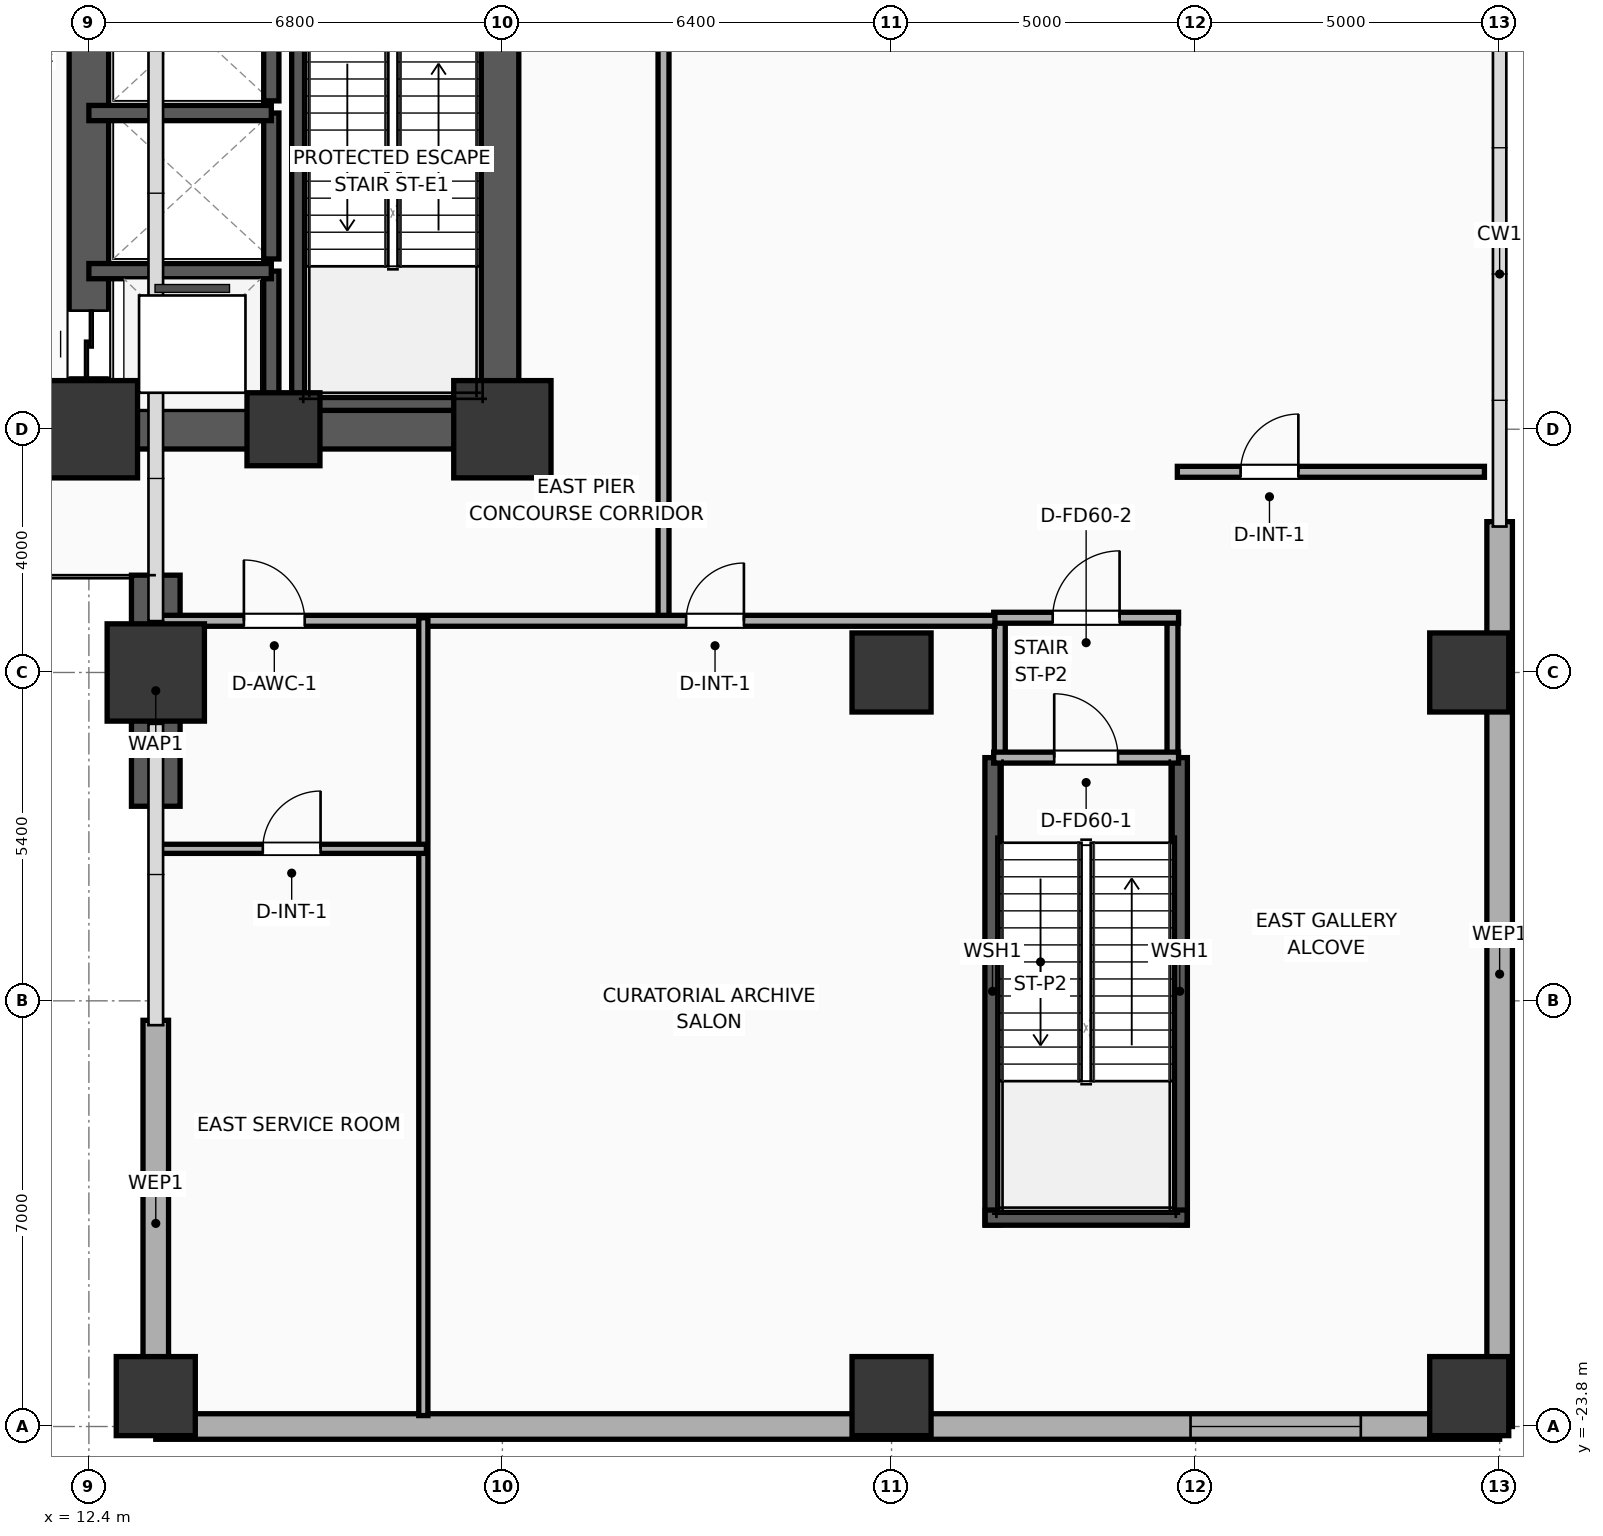
"""IFC4 building model, lengths in metres.
Left out: names, types, materials, properties, quantities, classifications, styles, units other than length and angle.
Written with IfcOpenShell. Run it as: python <this file> out.ifc"""

import sys

from ifc_helpers import new_model, si_unit, direction, frame, frame_2d, origin, origin_2d, place, context, subcontext, project, spatial, rectangle, extrude, element, fill, save


model = new_model("IFC4")
c1 = context("Model", 3, precision=1e-05, world=origin(), true_north=direction((0.0, 1.0)))
c2 = subcontext(c1, "Body", "Model", "MODEL_VIEW")
j1 = project(units=[si_unit("LENGTHUNIT", "METRE"), si_unit("PLANEANGLEUNIT", "RADIAN")], contexts=[c1])
p1 = place(None, origin())
s1 = spatial("IfcSite", under=j1, at=p1, CompositionType="ELEMENT")
p2 = place(p1, origin())
s2 = spatial("IfcBuilding", under=s1, at=p2, CompositionType="ELEMENT")
p3 = place(p2, frame((0.0, 0.0, 5.2)))
s3 = spatial("IfcBuildingStorey", under=s2, at=p3, CompositionType="ELEMENT", Elevation=5.2)
p4 = place(p3, frame((12.4, -7.4, 0.0), z_axis=(0.0, 0.0, 1.0), x_axis=(1.0, 0.0, 0.0)))
e1 = element("IfcColumn", 1, at=p4, inside=s3, PredefinedType="COLUMN", context=c2, shape_type="SweptSolid", body=[
    extrude(rectangle(XDim=1.6, YDim=1.6, at=origin_2d()), origin(), (0.0, 0.0, 1.0), 5.2),
])
p5 = place(p3, frame((15.6, -7.4, 0.0), z_axis=(0.0, 0.0, 1.0), x_axis=(1.0, 0.0, 0.0)))
e2 = element("IfcColumn", 2, at=p5, inside=s3, PredefinedType="COLUMN", context=c2, shape_type="SweptSolid", body=[
    extrude(rectangle(XDim=1.2, YDim=1.2, at=origin_2d()), origin(), (0.0, 0.0, 1.0), 5.2),
])
p6 = place(p3, frame((19.2, -7.4, 0.0), z_axis=(0.0, 0.0, 1.0), x_axis=(1.0, 0.0, 0.0)))
e3 = element("IfcColumn", 3, at=p6, inside=s3, PredefinedType="COLUMN", context=c2, shape_type="SweptSolid", body=[
    extrude(rectangle(XDim=1.6, YDim=1.6, at=origin_2d()), origin(), (0.0, 0.0, 1.0), 5.2),
])
p7 = place(p3, frame((12.075, -7.4, 0.0), z_axis=(0.0, 0.0, 1.0), x_axis=(1.0, 0.0, 0.0)))
e4 = element("IfcWall", 4, at=p7, inside=s3, PredefinedType="SHEAR", context=c2, shape_type="SweptSolid", body=[
    extrude(rectangle(XDim=7.45, YDim=0.65, at=frame_2d((3.725, 0.0))), origin(), (0.0, 0.0, 1.0), 4.92),
])
p8 = place(p3, frame((12.4, -7.4, 0.0), z_axis=(0.0, 0.0, 1.0), x_axis=(0.0, 1.0, 0.0)))
e5 = element("IfcWall", 5, at=p8, inside=s3, PredefinedType="SHEAR", context=c2, shape_type="SweptSolid", body=[
    extrude(rectangle(XDim=14.8, YDim=0.65, at=frame_2d((7.4, 0.0))), origin(), (0.0, 0.0, 1.0), 4.92),
])
p9 = place(p8, frame((0.85, 0.0, 0.0)))
e6 = element("IfcOpeningElement", 6, at=p9, cuts=e5, PredefinedType="OPENING", context=c2, shape_type="SweptSolid", body=[
    extrude(rectangle(XDim=1.1, YDim=2.05, at=frame_2d((0.55, 1.025))), frame((0.0, 0.335, 0.0), z_axis=(0.0, -1.0, 0.0), x_axis=(1.0, 0.0, 0.0)), (0.0, 0.0, 1.0), 0.67),
])
p10 = place(p8, frame((10.53, 0.0, 0.0)))
e7 = element("IfcOpeningElement", 7, at=p10, cuts=e5, PredefinedType="OPENING", context=c2, shape_type="SweptSolid", body=[
    extrude(rectangle(XDim=1.1, YDim=2.05, at=frame_2d((0.55, 1.025))), frame((0.0, 0.335, 0.0), z_axis=(0.0, -1.0, 0.0), x_axis=(1.0, 0.0, 0.0)), (0.0, 0.0, 1.0), 0.67),
])
p11 = place(p3, frame((19.145, -7.4, 0.0), z_axis=(0.0, 0.0, 1.0), x_axis=(0.0, 1.0, 0.0)))
e8 = element("IfcWall", 8, at=p11, inside=s3, PredefinedType="SHEAR", context=c2, shape_type="SweptSolid", body=[
    extrude(rectangle(XDim=14.8, YDim=0.65, at=frame_2d((7.4, 0.0))), origin(), (0.0, 0.0, 1.0), 4.92),
])
p12 = place(p3, frame((15.86, -7.085, 0.0), z_axis=(0.0, 0.0, 1.0), x_axis=(0.0, 1.0, 0.0)))
e9 = element("IfcWall", 9, at=p12, inside=s3, PredefinedType="SOLIDWALL", context=c2, shape_type="SweptSolid", body=[
    extrude(rectangle(XDim=7.685, YDim=0.25, at=frame_2d((3.843, 0.0))), origin(), (0.0, 0.0, 1.0), 4.92),
])
p13 = place(p3, frame((15.74, -6.965, 0.0), z_axis=(0.0, 0.0, 1.0), x_axis=(1.0, 0.0, 0.0)))
e10 = element("IfcWall", 10, at=p13, inside=s3, PredefinedType="SOLIDWALL", context=c2, shape_type="SweptSolid", body=[
    extrude(rectangle(XDim=3.46, YDim=0.25, at=frame_2d((1.73, 0.0))), origin(), (0.0, 0.0, 1.0), 4.92),
])
for number, where, z_axis, x_axis in (
    (11, (27.26, -20.485, 0.0), (0.0, 0.0, 1.0), (0.0, 1.0, 0.0)),
    (12, (30.34, -20.485, 0.0), (0.0, 0.0, 1.0), (0.0, 1.0, 0.0)),
):
    element("IfcWall", number, at=place(p3, frame(where, z_axis=z_axis, x_axis=x_axis)), inside=s3, PredefinedType="SOLIDWALL", context=c2, shape_type="SweptSolid", body=[
        extrude(rectangle(XDim=7.685, YDim=0.25, at=frame_2d((3.843, 0.0))), origin(), (0.0, 0.0, 1.0), 4.92),
    ])
p14 = place(p3, frame((27.14, -20.365, 0.0), z_axis=(0.0, 0.0, 1.0), x_axis=(1.0, 0.0, 0.0)))
e13 = element("IfcWall", 13, at=p14, inside=s3, PredefinedType="SOLIDWALL", context=c2, shape_type="SweptSolid", body=[
    extrude(rectangle(XDim=3.32, YDim=0.25, at=frame_2d((1.66, 0.0))), origin(), (0.0, 0.0, 1.0), 4.92),
])
p15 = place(p3, frame((13.5, -23.3, 0.0), z_axis=(0.0, 0.0, 1.0), x_axis=(1.0, 0.0, 0.0)))
e14 = element("IfcColumn", 14, at=p15, inside=s3, PredefinedType="COLUMN", context=c2, shape_type="SweptSolid", body=[
    extrude(rectangle(XDim=1.3, YDim=1.3, at=origin_2d()), origin(), (0.0, 0.0, 1.0), 5.2),
])
p16 = place(p3, frame((13.5, -11.4, 0.0), z_axis=(0.0, 0.0, 1.0), x_axis=(1.0, 0.0, 0.0)))
e15 = element("IfcColumn", 15, at=p16, inside=s3, PredefinedType="COLUMN", context=c2, shape_type="SweptSolid", body=[
    extrude(rectangle(XDim=1.6, YDim=1.6, at=origin_2d()), origin(), (0.0, 0.0, 1.0), 5.2),
])
for number, where, z_axis, x_axis in (
    (16, (25.6, -23.3, 0.0), (0.0, 0.0, 1.0), (1.0, 0.0, 0.0)),
    (17, (25.6, -11.4, 0.0), (0.0, 0.0, 1.0), (1.0, 0.0, 0.0)),
    (18, (35.1, -23.3, 0.0), (0.0, 0.0, 1.0), (1.0, 0.0, 0.0)),
    (19, (35.1, -11.4, 0.0), (0.0, 0.0, 1.0), (1.0, 0.0, 0.0)),
):
    element("IfcColumn", number, at=place(p3, frame(where, z_axis=z_axis, x_axis=x_axis)), inside=s3, PredefinedType="COLUMN", context=c2, shape_type="SweptSolid", body=[
        extrude(rectangle(XDim=1.3, YDim=1.3, at=origin_2d()), origin(), (0.0, 0.0, 1.0), 5.2),
    ])
p17 = place(p3, frame((13.5, -13.6, 0.0), z_axis=(0.0, 0.0, 1.0), x_axis=(0.0, 1.0, 0.0)))
e20 = element("IfcWall", 20, at=p17, inside=s3, PredefinedType="SOLIDWALL", context=c2, shape_type="SweptSolid", body=[
    extrude(rectangle(XDim=3.8, YDim=0.8, at=frame_2d((1.9, 0.0))), origin(), (0.0, 0.0, 1.0), 4.92),
])
p18 = place(p3, frame((13.5, -23.8, 0.0), z_axis=(0.0, 0.0, 1.0), x_axis=(1.0, 0.0, 0.0)))
e21 = element("IfcWall", 21, at=p18, inside=s3, PredefinedType="ELEMENTEDWALL", context=c2, shape_type="SweptSolid", body=[
    extrude(rectangle(XDim=22.1, YDim=0.42, at=frame_2d((11.05, 0.0))), origin(), (0.0, 0.0, 1.0), 4.92),
])
p19 = place(p18, frame((17.017, 0.0, 0.65)))
e22 = element("IfcOpeningElement", 22, at=p19, cuts=e21, PredefinedType="OPENING", context=c2, shape_type="SweptSolid", body=[
    extrude(rectangle(XDim=2.8, YDim=2.6, at=frame_2d((1.4, 1.3))), frame((0.0, 0.22, 0.0), z_axis=(0.0, -1.0, 0.0), x_axis=(1.0, 0.0, 0.0)), (0.0, 0.0, 1.0), 0.44),
])
p20 = place(p3, frame((35.6, -23.8, 0.0), z_axis=(0.0, 0.0, 1.0), x_axis=(0.0, 1.0, 0.0)))
e23 = element("IfcWall", 23, at=p20, inside=s3, PredefinedType="ELEMENTEDWALL", context=c2, shape_type="SweptSolid", body=[
    extrude(rectangle(XDim=14.88, YDim=0.42, at=frame_2d((7.44, 0.0))), origin(), (0.0, 0.0, 1.0), 4.92),
])
p21 = place(p3, frame((13.5, -23.8, 0.0), z_axis=(0.0, 0.0, 1.0), x_axis=(0.0, 1.0, 0.0)))
e24 = element("IfcWall", 24, at=p21, inside=s3, PredefinedType="ELEMENTEDWALL", context=c2, shape_type="SweptSolid", body=[
    extrude(rectangle(XDim=6.68, YDim=0.42, at=frame_2d((3.34, 0.0))), origin(), (0.0, 0.0, 1.0), 4.21),
])
p22 = place(p3, frame((15.4, -7.4, 0.0), z_axis=(0.0, 0.0, 1.0), x_axis=(0.0, 1.0, 0.0)))
e25 = element("IfcWall", 25, at=p22, inside=s3, PredefinedType="SOLIDWALL", context=c2, shape_type="SweptSolid", body=[
    extrude(rectangle(XDim=2.6, YDim=0.25, at=frame_2d((1.3, 0.0))), origin(), (0.0, 0.0, 1.0), 4.92),
])
p23 = place(p3, frame((15.4, -4.8, 0.0), z_axis=(0.0, 0.0, 1.0), x_axis=(-1.0, 0.0, 0.0)))
e26 = element("IfcWall", 26, at=p23, inside=s3, PredefinedType="SOLIDWALL", context=c2, shape_type="SweptSolid", body=[
    extrude(rectangle(XDim=3.0, YDim=0.25, at=frame_2d((1.5, 0.0))), origin(), (0.0, 0.0, 1.0), 4.92),
])
p24 = place(p3, frame((15.4, -4.6, 0.0), z_axis=(0.0, 0.0, 1.0), x_axis=(0.0, 1.0, 0.0)))
e27 = element("IfcWall", 27, at=p24, inside=s3, PredefinedType="SOLIDWALL", context=c2, shape_type="SweptSolid", body=[
    extrude(rectangle(XDim=2.4, YDim=0.25, at=frame_2d((1.2, 0.0))), origin(), (0.0, 0.0, 1.0), 4.92),
])
p25 = place(p3, frame((15.4, -2.2, 0.0), z_axis=(0.0, 0.0, 1.0), x_axis=(-1.0, 0.0, 0.0)))
e28 = element("IfcWall", 28, at=p25, inside=s3, PredefinedType="SOLIDWALL", context=c2, shape_type="SweptSolid", body=[
    extrude(rectangle(XDim=3.0, YDim=0.25, at=frame_2d((1.5, 0.0))), origin(), (0.0, 0.0, 1.0), 4.92),
])
p26 = place(p3, frame((15.4, -2.0, 0.0), z_axis=(0.0, 0.0, 1.0), x_axis=(0.0, 1.0, 0.0)))
e29 = element("IfcWall", 29, at=p26, inside=s3, PredefinedType="SOLIDWALL", context=c2, shape_type="SweptSolid", body=[
    extrude(rectangle(XDim=2.4, YDim=0.25, at=frame_2d((1.2, 0.0))), origin(), (0.0, 0.0, 1.0), 4.92),
])
p27 = place(p3, frame((9.88, -7.12, 0.0), z_axis=(0.0, 0.0, 1.0), x_axis=(1.0, 0.0, 0.0)))
e30 = element("IfcWall", 30, at=p27, inside=s3, PredefinedType="PARTITIONING", context=c2, shape_type="SweptSolid", body=[
    extrude(rectangle(XDim=2.27, YDim=0.18, at=frame_2d((1.135, 0.0))), origin(), (0.0, 0.0, 1.0), 4.21),
])
p28 = place(p27, frame((0.585, 0.0, 0.0)))
e31 = element("IfcOpeningElement", 31, at=p28, cuts=e30, PredefinedType="OPENING", context=c2, shape_type="SweptSolid", body=[
    extrude(rectangle(XDim=1.1, YDim=2.05, at=frame_2d((0.55, 1.025))), frame((0.0, 0.1, 0.0), z_axis=(0.0, -1.0, 0.0), x_axis=(1.0, 0.0, 0.0)), (0.0, 0.0, 1.0), 0.2),
])
for number, where, z_axis, x_axis in (
    (32, (27.38, -12.8, 0.0), (0.0, 0.0, 1.0), (0.0, 1.0, 0.0)),
    (33, (30.22, -12.8, 0.0), (0.0, 0.0, 1.0), (0.0, 1.0, 0.0)),
):
    element("IfcWall", number, at=place(p3, frame(where, z_axis=z_axis, x_axis=x_axis)), inside=s3, PredefinedType="PARTITIONING", context=c2, shape_type="SweptSolid", body=[
        extrude(rectangle(XDim=2.35, YDim=0.18, at=frame_2d((1.175, 0.0))), origin(), (0.0, 0.0, 1.0), 4.92),
    ])
p29 = place(p3, frame((27.28, -12.8, 0.0), z_axis=(0.0, 0.0, 1.0), x_axis=(1.0, 0.0, 0.0)))
e34 = element("IfcWall", 34, at=p29, inside=s3, PredefinedType="PARTITIONING", context=c2, shape_type="SweptSolid", body=[
    extrude(rectangle(XDim=3.04, YDim=0.18, at=frame_2d((1.52, 0.0))), origin(), (0.0, 0.0, 1.0), 4.92),
])
p30 = place(p29, frame((0.995, 0.0, 0.0)))
e35 = element("IfcOpeningElement", 35, at=p30, cuts=e34, PredefinedType="OPENING", context=c2, shape_type="SweptSolid", body=[
    extrude(rectangle(XDim=1.05, YDim=2.05, at=frame_2d((0.525, 1.025))), frame((0.0, 0.1, 0.0), z_axis=(0.0, -1.0, 0.0), x_axis=(1.0, 0.0, 0.0)), (0.0, 0.0, 1.0), 0.2),
])
p31 = place(p3, frame((27.28, -10.5, 0.0), z_axis=(0.0, 0.0, 1.0), x_axis=(1.0, 0.0, 0.0)))
e36 = element("IfcWall", 36, at=p31, inside=s3, PredefinedType="PARTITIONING", context=c2, shape_type="SweptSolid", body=[
    extrude(rectangle(XDim=3.04, YDim=0.18, at=frame_2d((1.52, 0.0))), origin(), (0.0, 0.0, 1.0), 4.92),
])
p32 = place(p31, frame((0.97, 0.0, 0.0)))
e37 = element("IfcOpeningElement", 37, at=p32, cuts=e36, PredefinedType="OPENING", context=c2, shape_type="SweptSolid", body=[
    extrude(rectangle(XDim=1.1, YDim=2.05, at=frame_2d((0.55, 1.025))), frame((0.0, 0.1, 0.0), z_axis=(0.0, -1.0, 0.0), x_axis=(1.0, 0.0, 0.0)), (0.0, 0.0, 1.0), 0.2),
])
p33 = place(p3, frame((21.85, -10.5, 0.0), z_axis=(0.0, 0.0, 1.0), x_axis=(0.0, 1.0, 0.0)))
e38 = element("IfcWall", 38, at=p33, inside=s3, PredefinedType="PARTITIONING", context=c2, shape_type="SweptSolid", body=[
    extrude(rectangle(XDim=34.12, YDim=0.18, at=frame_2d((17.06, 0.0))), origin(), (0.0, 0.0, 1.0), 4.92),
])
p34 = place(p33, frame((13.531, 0.0, 0.0)))
e39 = element("IfcOpeningElement", 39, at=p34, cuts=e38, PredefinedType="OPENING", context=c2, shape_type="SweptSolid", body=[
    extrude(rectangle(XDim=1.6, YDim=2.05, at=frame_2d((0.8, 1.025))), frame((0.0, 0.1, 0.0), z_axis=(0.0, -1.0, 0.0), x_axis=(1.0, 0.0, 0.0)), (0.0, 0.0, 1.0), 0.2),
])
p35 = place(p3, frame((30.3, -8.1, 0.0), z_axis=(0.0, 0.0, 1.0), x_axis=(1.0, 0.0, 0.0)))
e40 = element("IfcWall", 40, at=p35, inside=s3, PredefinedType="PARTITIONING", context=c2, shape_type="SweptSolid", body=[
    extrude(rectangle(XDim=5.05, YDim=0.18, at=frame_2d((2.525, 0.0))), origin(), (0.0, 0.0, 1.0), 4.92),
])
p36 = place(p35, frame((1.04, 0.0, 0.0)))
e41 = element("IfcOpeningElement", 41, at=p36, cuts=e40, PredefinedType="OPENING", context=c2, shape_type="SweptSolid", body=[
    extrude(rectangle(XDim=0.95, YDim=2.05, at=frame_2d((0.475, 1.025))), frame((0.0, 0.1, 0.0), z_axis=(0.0, -1.0, 0.0), x_axis=(1.0, 0.0, 0.0)), (0.0, 0.0, 1.0), 0.2),
])
p37 = place(p3, frame((13.52, -10.55, 0.0), z_axis=(0.0, 0.0, 1.0), x_axis=(1.0, 0.0, 0.0)))
e42 = element("IfcWall", 42, at=p37, inside=s3, PredefinedType="PARTITIONING", context=c2, shape_type="SweptSolid", body=[
    extrude(rectangle(XDim=13.78, YDim=0.18, at=frame_2d((6.89, 0.0))), origin(), (0.0, 0.0, 1.0), 4.92),
])
p38 = place(p37, frame((1.429, 0.0, 0.0)))
e43 = element("IfcOpeningElement", 43, at=p38, cuts=e42, PredefinedType="OPENING", context=c2, shape_type="SweptSolid", body=[
    extrude(rectangle(XDim=1.0, YDim=2.05, at=frame_2d((0.5, 1.025))), frame((0.0, 0.1, 0.0), z_axis=(0.0, -1.0, 0.0), x_axis=(1.0, 0.0, 0.0)), (0.0, 0.0, 1.0), 0.2),
])
p39 = place(p37, frame((8.702, 0.0, 0.0)))
e44 = element("IfcOpeningElement", 44, at=p39, cuts=e42, PredefinedType="OPENING", context=c2, shape_type="SweptSolid", body=[
    extrude(rectangle(XDim=0.95, YDim=2.05, at=frame_2d((0.475, 1.025))), frame((0.0, 0.1, 0.0), z_axis=(0.0, -1.0, 0.0), x_axis=(1.0, 0.0, 0.0)), (0.0, 0.0, 1.0), 0.2),
])
p40 = place(p3, frame((17.9, -23.62, 0.0), z_axis=(0.0, 0.0, 1.0), x_axis=(0.0, 1.0, 0.0)))
e45 = element("IfcWall", 45, at=p40, inside=s3, PredefinedType="PLUMBINGWALL", context=c2, shape_type="SweptSolid", body=[
    extrude(rectangle(XDim=13.12, YDim=0.15, at=frame_2d((6.56, 0.0))), origin(), (0.0, 0.0, 1.0), 4.92),
])
p41 = place(p3, frame((13.52, -14.3, 0.0), z_axis=(0.0, 0.0, 1.0), x_axis=(1.0, 0.0, 0.0)))
e46 = element("IfcWall", 46, at=p41, inside=s3, PredefinedType="PLUMBINGWALL", context=c2, shape_type="SweptSolid", body=[
    extrude(rectangle(XDim=4.43, YDim=0.15, at=frame_2d((2.215, 0.0))), origin(), (0.0, 0.0, 1.0), 4.92),
])
p42 = place(p41, frame((1.74, 0.0, 0.0)))
e47 = element("IfcOpeningElement", 47, at=p42, cuts=e46, PredefinedType="OPENING", context=c2, shape_type="SweptSolid", body=[
    extrude(rectangle(XDim=0.95, YDim=2.05, at=frame_2d((0.475, 1.025))), frame((0.0, 0.085, 0.0), z_axis=(0.0, -1.0, 0.0), x_axis=(1.0, 0.0, 0.0)), (0.0, 0.0, 1.0), 0.17),
])
p43 = place(p19, origin())
e48 = element("IfcWindow", 48, at=p43, inside=s3, PartitioningType="SINGLE_PANEL", PredefinedType="WINDOW", context=c2, shape_type="SweptSolid", body=[
    extrude(rectangle(XDim=2.8, YDim=2.6, at=frame_2d((1.4, 1.3))), frame((0.0, 0.03, 0.0), z_axis=(0.0, -1.0, 0.0), x_axis=(1.0, 0.0, 0.0)), (0.0, 0.0, 1.0), 0.06),
])
fill(e22, e48)
p44 = place(p9, origin())
e49 = element("IfcDoor", 49, at=p44, inside=s3, OperationType="SLIDING_TO_LEFT", PredefinedType="DOOR", context=c2, shape_type="SweptSolid", body=[
    extrude(rectangle(XDim=1.1, YDim=2.05, at=frame_2d((0.55, 1.025))), frame((0.0, 0.025, 0.0), z_axis=(0.0, -1.0, 0.0), x_axis=(1.0, 0.0, 0.0)), (0.0, 0.0, 1.0), 0.05),
])
fill(e6, e49)
p45 = place(p30, origin())
e50 = element("IfcDoor", 50, at=p45, inside=s3, OperationType="SINGLE_SWING_LEFT", PredefinedType="DOOR", context=c2, shape_type="SweptSolid", body=[
    extrude(rectangle(XDim=1.05, YDim=2.05, at=frame_2d((0.525, 1.025))), frame((0.0, 0.025, 0.0), z_axis=(0.0, -1.0, 0.0), x_axis=(1.0, 0.0, 0.0)), (0.0, 0.0, 1.0), 0.05),
])
fill(e35, e50)
p46 = place(p32, origin())
e51 = element("IfcDoor", 51, at=p46, inside=s3, OperationType="SINGLE_SWING_RIGHT", PredefinedType="DOOR", context=c2, shape_type="SweptSolid", body=[
    extrude(rectangle(XDim=1.1, YDim=2.05, at=frame_2d((0.55, 1.025))), frame((0.0, 0.025, 0.0), z_axis=(0.0, -1.0, 0.0), x_axis=(1.0, 0.0, 0.0)), (0.0, 0.0, 1.0), 0.05),
])
fill(e37, e51)
p47 = place(p36, origin())
e52 = element("IfcDoor", 52, at=p47, inside=s3, OperationType="SINGLE_SWING_RIGHT", PredefinedType="DOOR", context=c2, shape_type="SweptSolid", body=[
    extrude(rectangle(XDim=0.95, YDim=2.05, at=frame_2d((0.475, 1.025))), frame((0.0, 0.025, 0.0), z_axis=(0.0, -1.0, 0.0), x_axis=(1.0, 0.0, 0.0)), (0.0, 0.0, 1.0), 0.05),
])
fill(e41, e52)
p48 = place(p38, origin())
e53 = element("IfcDoor", 53, at=p48, inside=s3, OperationType="SINGLE_SWING_LEFT", PredefinedType="DOOR", context=c2, shape_type="SweptSolid", body=[
    extrude(rectangle(XDim=1.0, YDim=2.05, at=frame_2d((0.5, 1.025))), frame((0.0, 0.025, 0.0), z_axis=(0.0, -1.0, 0.0), x_axis=(1.0, 0.0, 0.0)), (0.0, 0.0, 1.0), 0.05),
])
fill(e43, e53)
p49 = place(p39, origin())
e54 = element("IfcDoor", 54, at=p49, inside=s3, OperationType="SINGLE_SWING_RIGHT", PredefinedType="DOOR", context=c2, shape_type="SweptSolid", body=[
    extrude(rectangle(XDim=0.95, YDim=2.05, at=frame_2d((0.475, 1.025))), frame((0.0, 0.025, 0.0), z_axis=(0.0, -1.0, 0.0), x_axis=(1.0, 0.0, 0.0)), (0.0, 0.0, 1.0), 0.05),
])
fill(e44, e54)
p50 = place(p42, origin())
e55 = element("IfcDoor", 55, at=p50, inside=s3, OperationType="SINGLE_SWING_RIGHT", PredefinedType="DOOR", context=c2, shape_type="SweptSolid", body=[
    extrude(rectangle(XDim=0.95, YDim=2.05, at=frame_2d((0.475, 1.025))), frame((0.0, 0.025, 0.0), z_axis=(0.0, -1.0, 0.0), x_axis=(1.0, 0.0, 0.0)), (0.0, 0.0, 1.0), 0.05),
])
fill(e47, e55)
save(model, sys.argv[1])
